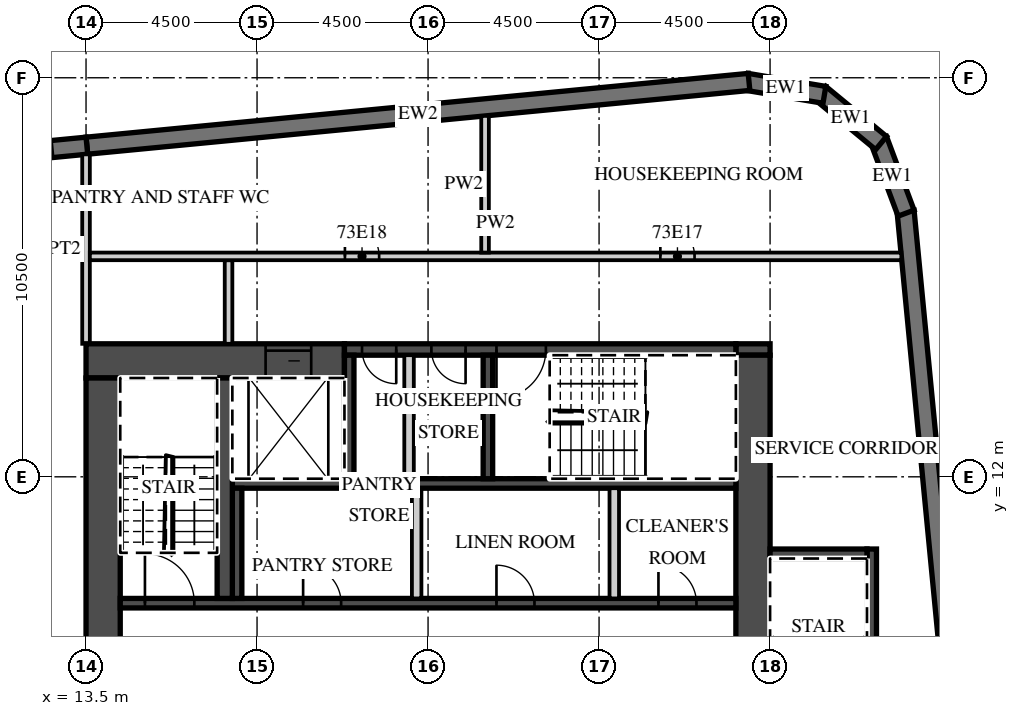
"""IFC4 building model, lengths in metres.
Left out: names, types, materials, properties, quantities, classifications, styles, units other than length and angle.
Written with IfcOpenShell. Run it as: python <this file> out.ifc"""

import sys

from ifc_helpers import new_model, si_unit, direction, frame, frame_2d, origin, place, context, subcontext, project, spatial, polyline, rectangle, outline, extrude, element, fill, save


model = new_model("IFC4")
c1 = context("Model", 3, precision=1e-05, world=origin(), true_north=direction((0.0, 1.0)))
c2 = subcontext(c1, "Body", "Model", "MODEL_VIEW")
j1 = project(units=[si_unit("LENGTHUNIT", "METRE"), si_unit("PLANEANGLEUNIT", "RADIAN")], contexts=[c1])
p1 = place(None, origin())
s1 = spatial("IfcSite", under=j1, at=p1, CompositionType="ELEMENT")
p2 = place(p1, origin())
s2 = spatial("IfcBuilding", under=s1, at=p2, CompositionType="ELEMENT")
p3 = place(p2, frame((0.0, 0.0, 291.6)))
s3 = spatial("IfcBuildingStorey", under=s2, at=p3, CompositionType="ELEMENT", Elevation=291.6)
p4 = place(p3, frame((38.132, -12.858, 0.0), z_axis=(0.0, 0.0, 1.0), x_axis=(-0.095847749461, 0.995396006082, 0.0)))
e1 = element("IfcWall", 1, at=p4, inside=s3, PredefinedType="SOLIDWALL", context=c2, shape_type="SweptSolid", body=[
    extrude(rectangle(XDim=32.0, YDim=0.45, at=frame_2d((16.0, 0.0))), origin(), (0.0, 0.0, 1.0), 3.02),
])
p5 = place(p3, frame((35.078, 18.938, 0.0), z_axis=(0.0, 0.0, 1.0), x_axis=(-0.350192909346, 0.936677599948, 0.0)))
e2 = element("IfcWall", 2, at=p5, inside=s3, PredefinedType="SOLIDWALL", context=c2, shape_type="SweptSolid", body=[
    extrude(outline(polyline([(0.0, -0.225), (2.071, -0.225), (1.95, 0.225), (0.121, 0.225), (0.0, -0.225)])), origin(), (0.0, 0.0, 1.0), 3.02),
])
p6 = place(p3, frame((34.421, 20.782, 0.0), z_axis=(0.0, 0.0, 1.0), x_axis=(-0.771593176315, 0.636116318187, 0.0)))
e3 = element("IfcWall", 3, at=p6, inside=s3, PredefinedType="SOLIDWALL", context=c2, shape_type="SweptSolid", body=[
    extrude(outline(polyline([(0.0, -0.225), (2.071, -0.225), (1.95, 0.225), (0.12, 0.225), (0.0, -0.225)])), origin(), (0.0, 0.0, 1.0), 3.02),
])
p7 = place(p3, frame((32.929, 22.051, 0.0), z_axis=(0.0, 0.0, 1.0), x_axis=(-0.986298144721, 0.164972633245, 0.0)))
e4 = element("IfcWall", 4, at=p7, inside=s3, PredefinedType="SOLIDWALL", context=c2, shape_type="SweptSolid", body=[
    extrude(outline(polyline([(0.0, -0.225), (2.07, -0.225), (1.95, 0.225), (0.121, 0.225), (0.0, -0.225)])), origin(), (0.0, 0.0, 1.0), 3.02),
])
p8 = place(p3, frame((30.946, 22.391, 0.0), z_axis=(0.0, 0.0, 1.0), x_axis=(-0.995396397117, -0.095843688398, 0.0)))
e5 = element("IfcWall", 5, at=p8, inside=s3, PredefinedType="SOLIDWALL", context=c2, shape_type="SweptSolid", body=[
    extrude(rectangle(XDim=17.505, YDim=0.45, at=frame_2d((8.752, 0.0))), origin(), (0.0, 0.0, 1.0), 3.02),
])
p9 = place(p3, frame((13.521, 20.713, 0.0), z_axis=(0.0, 0.0, 1.0), x_axis=(-0.995396277313, -0.095844932638, 0.0)))
e6 = element("IfcWall", 6, at=p9, inside=s3, PredefinedType="SOLIDWALL", context=c2, shape_type="SweptSolid", body=[
    extrude(rectangle(XDim=51.495, YDim=0.45, at=frame_2d((25.748, 0.0))), origin(), (0.0, 0.0, 1.0), 3.02),
])
p10 = place(p9, frame((0.91, 0.0, 0.45)))
e7 = element("IfcOpeningElement", 7, at=p10, cuts=e6, PredefinedType="OPENING", context=c2, shape_type="SweptSolid", body=[
    extrude(rectangle(XDim=2.7, YDim=2.25, at=frame_2d((1.35, 1.125))), frame((0.0, 0.235, 0.0), z_axis=(0.0, -1.0, 0.0), x_axis=(1.0, 0.0, 0.0)), (0.0, 0.0, 1.0), 0.47),
])
p11 = place(p9, frame((5.431, 0.0, 0.45)))
e8 = element("IfcOpeningElement", 8, at=p11, cuts=e6, PredefinedType="OPENING", context=c2, shape_type="SweptSolid", body=[
    extrude(rectangle(XDim=2.7, YDim=2.25, at=frame_2d((1.35, 1.125))), frame((0.0, 0.235, 0.0), z_axis=(0.0, -1.0, 0.0), x_axis=(1.0, 0.0, 0.0)), (0.0, 0.0, 1.0), 0.47),
])
p12 = place(p9, frame((9.952, 0.0, 0.45)))
e9 = element("IfcOpeningElement", 9, at=p12, cuts=e6, PredefinedType="OPENING", context=c2, shape_type="SweptSolid", body=[
    extrude(rectangle(XDim=2.7, YDim=2.25, at=frame_2d((1.35, 1.125))), frame((0.0, 0.235, 0.0), z_axis=(0.0, -1.0, 0.0), x_axis=(1.0, 0.0, 0.0)), (0.0, 0.0, 1.0), 0.47),
])
p13 = place(p9, frame((14.473, 0.0, 0.45)))
e10 = element("IfcOpeningElement", 10, at=p13, cuts=e6, PredefinedType="OPENING", context=c2, shape_type="SweptSolid", body=[
    extrude(rectangle(XDim=2.7, YDim=2.25, at=frame_2d((1.35, 1.125))), frame((0.0, 0.235, 0.0), z_axis=(0.0, -1.0, 0.0), x_axis=(1.0, 0.0, 0.0)), (0.0, 0.0, 1.0), 0.47),
])
p14 = place(p9, frame((18.994, 0.0, 0.45)))
e11 = element("IfcOpeningElement", 11, at=p14, cuts=e6, PredefinedType="OPENING", context=c2, shape_type="SweptSolid", body=[
    extrude(rectangle(XDim=2.7, YDim=2.25, at=frame_2d((1.35, 1.125))), frame((0.0, 0.235, 0.0), z_axis=(0.0, -1.0, 0.0), x_axis=(1.0, 0.0, 0.0)), (0.0, 0.0, 1.0), 0.47),
])
p15 = place(p9, frame((23.514, 0.0, 0.45)))
e12 = element("IfcOpeningElement", 12, at=p15, cuts=e6, PredefinedType="OPENING", context=c2, shape_type="SweptSolid", body=[
    extrude(rectangle(XDim=2.7, YDim=2.25, at=frame_2d((1.35, 1.125))), frame((0.0, 0.235, 0.0), z_axis=(0.0, -1.0, 0.0), x_axis=(1.0, 0.0, 0.0)), (0.0, 0.0, 1.0), 0.47),
])
p16 = place(p9, frame((28.035, 0.0, 0.45)))
e13 = element("IfcOpeningElement", 13, at=p16, cuts=e6, PredefinedType="OPENING", context=c2, shape_type="SweptSolid", body=[
    extrude(rectangle(XDim=2.7, YDim=2.25, at=frame_2d((1.35, 1.125))), frame((0.0, 0.235, 0.0), z_axis=(0.0, -1.0, 0.0), x_axis=(1.0, 0.0, 0.0)), (0.0, 0.0, 1.0), 0.47),
])
p17 = place(p9, frame((32.556, 0.0, 0.45)))
e14 = element("IfcOpeningElement", 14, at=p17, cuts=e6, PredefinedType="OPENING", context=c2, shape_type="SweptSolid", body=[
    extrude(rectangle(XDim=2.7, YDim=2.25, at=frame_2d((1.35, 1.125))), frame((0.0, 0.235, 0.0), z_axis=(0.0, -1.0, 0.0), x_axis=(1.0, 0.0, 0.0)), (0.0, 0.0, 1.0), 0.47),
])
p18 = place(p9, frame((37.077, 0.0, 0.45)))
e15 = element("IfcOpeningElement", 15, at=p18, cuts=e6, PredefinedType="OPENING", context=c2, shape_type="SweptSolid", body=[
    extrude(rectangle(XDim=2.7, YDim=2.25, at=frame_2d((1.35, 1.125))), frame((0.0, 0.235, 0.0), z_axis=(0.0, -1.0, 0.0), x_axis=(1.0, 0.0, 0.0)), (0.0, 0.0, 1.0), 0.47),
])
p19 = place(p9, frame((41.598, 0.0, 0.45)))
e16 = element("IfcOpeningElement", 16, at=p19, cuts=e6, PredefinedType="OPENING", context=c2, shape_type="SweptSolid", body=[
    extrude(rectangle(XDim=2.7, YDim=2.25, at=frame_2d((1.35, 1.125))), frame((0.0, 0.235, 0.0), z_axis=(0.0, -1.0, 0.0), x_axis=(1.0, 0.0, 0.0)), (0.0, 0.0, 1.0), 0.47),
])
p20 = place(p9, frame((46.118, 0.0, 0.45)))
e17 = element("IfcOpeningElement", 17, at=p20, cuts=e6, PredefinedType="OPENING", context=c2, shape_type="SweptSolid", body=[
    extrude(rectangle(XDim=2.7, YDim=2.25, at=frame_2d((1.35, 1.125))), frame((0.0, 0.235, 0.0), z_axis=(0.0, -1.0, 0.0), x_axis=(1.0, 0.0, 0.0)), (0.0, 0.0, 1.0), 0.47),
])
p21 = place(p3, frame((13.5, 15.5, 0.0), z_axis=(0.0, 0.0, 1.0), x_axis=(0.0, 1.0, 0.0)))
e18 = element("IfcWall", 18, at=p21, inside=s3, PredefinedType="PARTITIONING", context=c2, shape_type="SweptSolid", body=[
    extrude(rectangle(XDim=4.985, YDim=0.2, at=frame_2d((2.493, 0.0))), origin(), (0.0, 0.0, 1.0), 3.02),
])
p22 = place(p3, frame((13.5, 15.05, 0.0), z_axis=(0.0, 0.0, 1.0), x_axis=(1.0, 0.0, 0.0)))
e19 = element("IfcWall", 19, at=p22, inside=s3, PredefinedType="SHEAR", context=c2, shape_type="SweptSolid", body=[
    extrude(rectangle(XDim=6.8, YDim=0.9, at=frame_2d((3.4, 0.0))), origin(), (0.0, 0.0, 1.0), 3.02),
])
p23 = place(p22, frame((4.725, 0.0, 0.0)))
e20 = element("IfcOpeningElement", 20, at=p23, cuts=e19, PredefinedType="OPENING", context=c2, shape_type="SweptSolid", body=[
    extrude(rectangle(XDim=1.2, YDim=2.1, at=frame_2d((0.6, 1.05))), frame((0.0, 0.46, 0.0), z_axis=(0.0, -1.0, 0.0), x_axis=(1.0, 0.0, 0.0)), (0.0, 0.0, 1.0), 0.92),
])
p24 = place(p3, frame((30.6, 15.35, 0.0), z_axis=(0.0, 0.0, 1.0), x_axis=(1.0, 0.0, 0.0)))
e21 = element("IfcWall", 21, at=p24, inside=s3, PredefinedType="SHEAR", context=c2, shape_type="SweptSolid", body=[
    extrude(rectangle(XDim=0.9, YDim=0.3, at=frame_2d((0.45, 0.0))), origin(), (0.0, 0.0, 1.0), 3.02),
])
p25 = place(p3, frame((20.3, 15.35, 0.0), z_axis=(0.0, 0.0, 1.0), x_axis=(1.0, 0.0, 0.0)))
e22 = element("IfcWall", 22, at=p25, inside=s3, PredefinedType="SHEAR", context=c2, shape_type="SweptSolid", body=[
    extrude(rectangle(XDim=10.3, YDim=0.3, at=frame_2d((5.15, 0.0))), origin(), (0.0, 0.0, 1.0), 3.02),
])
p26 = place(p25, frame((4.0, 0.0, 0.0)))
e23 = element("IfcOpeningElement", 23, at=p26, cuts=e22, PredefinedType="OPENING", context=c2, shape_type="SweptSolid", body=[
    extrude(rectangle(XDim=1.3, YDim=2.1, at=frame_2d((0.65, 1.05))), frame((0.0, 0.16, 0.0), z_axis=(0.0, -1.0, 0.0), x_axis=(1.0, 0.0, 0.0)), (0.0, 0.0, 1.0), 0.32),
])
p27 = place(p25, frame((2.288, 0.0, 0.0)))
e24 = element("IfcOpeningElement", 24, at=p27, cuts=e22, PredefinedType="OPENING", context=c2, shape_type="SweptSolid", body=[
    extrude(rectangle(XDim=0.9, YDim=2.1, at=frame_2d((0.45, 1.05))), frame((0.0, 0.16, 0.0), z_axis=(0.0, -1.0, 0.0), x_axis=(1.0, 0.0, 0.0)), (0.0, 0.0, 1.0), 0.32),
])
p28 = place(p25, frame((0.462, 0.0, 0.0)))
e25 = element("IfcOpeningElement", 25, at=p28, cuts=e22, PredefinedType="OPENING", context=c2, shape_type="SweptSolid", body=[
    extrude(rectangle(XDim=0.9, YDim=2.1, at=frame_2d((0.45, 1.05))), frame((0.0, 0.16, 0.0), z_axis=(0.0, -1.0, 0.0), x_axis=(1.0, 0.0, 0.0)), (0.0, 0.0, 1.0), 0.32),
])
p29 = place(p3, frame((31.05, 2.4, 0.0), z_axis=(0.0, 0.0, 1.0), x_axis=(0.0, 1.0, 0.0)))
e26 = element("IfcWall", 26, at=p29, inside=s3, PredefinedType="SHEAR", context=c2, shape_type="SweptSolid", body=[
    extrude(rectangle(XDim=12.8, YDim=0.9, at=frame_2d((6.4, 0.0))), origin(), (0.0, 0.0, 1.0), 3.02),
])
p30 = place(p29, frame((0.2, 0.0, 0.0)))
e27 = element("IfcOpeningElement", 27, at=p30, cuts=e26, PredefinedType="OPENING", context=c2, shape_type="SweptSolid", body=[
    extrude(rectangle(XDim=1.1, YDim=2.1, at=frame_2d((0.55, 1.05))), frame((0.0, 0.46, 0.0), z_axis=(0.0, -1.0, 0.0), x_axis=(1.0, 0.0, 0.0)), (0.0, 0.0, 1.0), 0.92),
])
p31 = place(p3, frame((13.95, 2.4, 0.0), z_axis=(0.0, 0.0, 1.0), x_axis=(0.0, 1.0, 0.0)))
e28 = element("IfcWall", 28, at=p31, inside=s3, PredefinedType="SHEAR", context=c2, shape_type="SweptSolid", body=[
    extrude(rectangle(XDim=12.2, YDim=0.9, at=frame_2d((6.1, 0.0))), origin(), (0.0, 0.0, 1.0), 3.02),
])
p32 = place(p3, frame((14.4, 8.675, 0.0), z_axis=(0.0, 0.0, 1.0), x_axis=(1.0, 0.0, 0.0)))
e29 = element("IfcWall", 29, at=p32, inside=s3, PredefinedType="SHEAR", context=c2, shape_type="SweptSolid", body=[
    extrude(rectangle(XDim=16.2, YDim=0.25, at=frame_2d((8.1, 0.0))), origin(), (0.0, 0.0, 1.0), 3.02),
])
p33 = place(p32, frame((0.65, 0.0, 0.0)))
e30 = element("IfcOpeningElement", 30, at=p33, cuts=e29, PredefinedType="OPENING", context=c2, shape_type="SweptSolid", body=[
    extrude(rectangle(XDim=1.3, YDim=2.1, at=frame_2d((0.65, 1.05))), frame((0.0, 0.135, 0.0), z_axis=(0.0, -1.0, 0.0), x_axis=(1.0, 0.0, 0.0)), (0.0, 0.0, 1.0), 0.27),
])
p34 = place(p32, frame((14.163, 0.0, 0.0)))
e31 = element("IfcOpeningElement", 31, at=p34, cuts=e29, PredefinedType="OPENING", context=c2, shape_type="SweptSolid", body=[
    extrude(rectangle(XDim=1.0, YDim=2.1, at=frame_2d((0.5, 1.05))), frame((0.0, 0.135, 0.0), z_axis=(0.0, -1.0, 0.0), x_axis=(1.0, 0.0, 0.0)), (0.0, 0.0, 1.0), 0.27),
])
p35 = place(p32, frame((9.9, 0.0, 0.0)))
e32 = element("IfcOpeningElement", 32, at=p35, cuts=e29, PredefinedType="OPENING", context=c2, shape_type="SweptSolid", body=[
    extrude(rectangle(XDim=1.0, YDim=2.1, at=frame_2d((0.5, 1.05))), frame((0.0, 0.135, 0.0), z_axis=(0.0, -1.0, 0.0), x_axis=(1.0, 0.0, 0.0)), (0.0, 0.0, 1.0), 0.27),
])
p36 = place(p32, frame((4.812, 0.0, 0.0)))
e33 = element("IfcOpeningElement", 33, at=p36, cuts=e29, PredefinedType="OPENING", context=c2, shape_type="SweptSolid", body=[
    extrude(rectangle(XDim=1.0, YDim=2.1, at=frame_2d((0.5, 1.05))), frame((0.0, 0.135, 0.0), z_axis=(0.0, -1.0, 0.0), x_axis=(1.0, 0.0, 0.0)), (0.0, 0.0, 1.0), 0.27),
])
p37 = place(p3, frame((17.35, 11.825, 0.0), z_axis=(0.0, 0.0, 1.0), x_axis=(1.0, 0.0, 0.0)))
e34 = element("IfcWall", 34, at=p37, inside=s3, PredefinedType="SHEAR", context=c2, shape_type="SweptSolid", body=[
    extrude(rectangle(XDim=13.25, YDim=0.25, at=frame_2d((6.625, 0.0))), origin(), (0.0, 0.0, 1.0), 3.02),
])
p38 = place(p3, frame((17.475, 8.8, 0.0), z_axis=(0.0, 0.0, 1.0), x_axis=(0.0, 1.0, 0.0)))
e35 = element("IfcWall", 35, at=p38, inside=s3, PredefinedType="SHEAR", context=c2, shape_type="SweptSolid", body=[
    extrude(rectangle(XDim=2.9, YDim=0.25, at=frame_2d((1.45, 0.0))), origin(), (0.0, 0.0, 1.0), 3.02),
])
for number, where, z_axis, x_axis in (
    (36, (27.4, 8.8, 0.0), (0.0, 0.0, 1.0), (0.0, 1.0, 0.0)),
    (37, (22.2, 8.8, 0.0), (0.0, 0.0, 1.0), (0.0, 1.0, 0.0)),
):
    element("IfcWall", number, at=place(p3, frame(where, z_axis=z_axis, x_axis=x_axis)), inside=s3, PredefinedType="PARTITIONING", context=c2, shape_type="SweptSolid", body=[
        extrude(rectangle(XDim=2.9, YDim=0.25, at=frame_2d((1.45, 0.0))), origin(), (0.0, 0.0, 1.0), 3.02),
    ])
p39 = place(p3, frame((17.15, 8.8, 0.0), z_axis=(0.0, 0.0, 1.0), x_axis=(0.0, 1.0, 0.0)))
e38 = element("IfcWall", 38, at=p39, inside=s3, PredefinedType="SHEAR", context=c2, shape_type="SweptSolid", body=[
    extrude(rectangle(XDim=5.8, YDim=0.4, at=frame_2d((2.9, 0.0))), origin(), (0.0, 0.0, 1.0), 3.02),
])
for number, where, z_axis, x_axis in (
    (39, (20.425, 11.95, 0.0), (0.0, 0.0, 1.0), (0.0, 1.0, 0.0)),
    (40, (24.075, 11.95, 0.0), (0.0, 0.0, 1.0), (0.0, 1.0, 0.0)),
):
    element("IfcWall", number, at=place(p3, frame(where, z_axis=z_axis, x_axis=x_axis)), inside=s3, PredefinedType="SHEAR", context=c2, shape_type="SweptSolid", body=[
        extrude(rectangle(XDim=3.25, YDim=0.25, at=frame_2d((1.625, 0.0))), origin(), (0.0, 0.0, 1.0), 3.02),
    ])
p40 = place(p3, frame((22.0, 11.95, 0.0), z_axis=(0.0, 0.0, 1.0), x_axis=(0.0, 1.0, 0.0)))
e41 = element("IfcWall", 41, at=p40, inside=s3, PredefinedType="PARTITIONING", context=c2, shape_type="SweptSolid", body=[
    extrude(rectangle(XDim=3.25, YDim=0.25, at=frame_2d((1.625, 0.0))), origin(), (0.0, 0.0, 1.0), 3.02),
])
p41 = place(p3, frame((34.175, 1.75, 0.0), z_axis=(0.0, 0.0, 1.0), x_axis=(0.0, 1.0, 0.0)))
e42 = element("IfcWall", 42, at=p41, inside=s3, PredefinedType="SHEAR", context=c2, shape_type="SweptSolid", body=[
    extrude(rectangle(XDim=8.35, YDim=0.25, at=frame_2d((4.175, 0.0))), origin(), (0.0, 0.0, 1.0), 3.02),
])
p42 = place(p3, frame((31.5, 9.975, 0.0), z_axis=(0.0, 0.0, 1.0), x_axis=(1.0, 0.0, 0.0)))
e43 = element("IfcWall", 43, at=p42, inside=s3, PredefinedType="SHEAR", context=c2, shape_type="SweptSolid", body=[
    extrude(rectangle(XDim=2.55, YDim=0.25, at=frame_2d((1.275, 0.0))), origin(), (0.0, 0.0, 1.0), 3.02),
])
p43 = place(p3, frame((17.25, 15.5, 0.0), z_axis=(0.0, 0.0, 1.0), x_axis=(0.0, 1.0, 0.0)))
e44 = element("IfcWall", 44, at=p43, inside=s3, PredefinedType="PARTITIONING", context=c2, shape_type="SweptSolid", body=[
    extrude(rectangle(XDim=2.2, YDim=0.2, at=frame_2d((1.1, 0.0))), origin(), (0.0, 0.0, 1.0), 3.02),
])
p44 = place(p3, frame((13.6, 17.8, 0.0), z_axis=(0.0, 0.0, 1.0), x_axis=(1.0, 0.0, 0.0)))
e45 = element("IfcWall", 45, at=p44, inside=s3, PredefinedType="PARTITIONING", context=c2, shape_type="SweptSolid", body=[
    extrude(rectangle(XDim=21.354, YDim=0.2, at=frame_2d((10.677, 0.0))), origin(), (0.0, 0.0, 1.0), 3.02),
])
p45 = place(p44, frame((15.012, 0.0, 0.0)))
e46 = element("IfcOpeningElement", 46, at=p45, cuts=e45, PredefinedType="OPENING", context=c2, shape_type="SweptSolid", body=[
    extrude(rectangle(XDim=0.9, YDim=2.1, at=frame_2d((0.45, 1.05))), frame((0.0, 0.11, 0.0), z_axis=(0.0, -1.0, 0.0), x_axis=(1.0, 0.0, 0.0)), (0.0, 0.0, 1.0), 0.22),
])
p46 = place(p44, frame((6.712, 0.0, 0.0)))
e47 = element("IfcOpeningElement", 47, at=p46, cuts=e45, PredefinedType="OPENING", context=c2, shape_type="SweptSolid", body=[
    extrude(rectangle(XDim=0.9, YDim=2.1, at=frame_2d((0.45, 1.05))), frame((0.0, 0.11, 0.0), z_axis=(0.0, -1.0, 0.0), x_axis=(1.0, 0.0, 0.0)), (0.0, 0.0, 1.0), 0.22),
])
p47 = place(p3, frame((24.0, 17.9, 0.0), z_axis=(0.0, 0.0, 1.0), x_axis=(0.0, 1.0, 0.0)))
e48 = element("IfcWall", 48, at=p47, inside=s3, PredefinedType="PARTITIONING", context=c2, shape_type="SweptSolid", body=[
    extrude(rectangle(XDim=3.597, YDim=0.2, at=frame_2d((1.798, 0.0))), origin(), (0.0, 0.0, 1.0), 3.02),
])
p48 = place(p10, origin())
e49 = element("IfcWindow", 49, at=p48, inside=s3, PartitioningType="SINGLE_PANEL", PredefinedType="WINDOW", context=c2, shape_type="SweptSolid", body=[
    extrude(rectangle(XDim=2.7, YDim=2.25, at=frame_2d((1.35, 1.125))), frame((0.0, 0.09, 0.0), z_axis=(0.0, -1.0, 0.0), x_axis=(1.0, 0.0, 0.0)), (0.0, 0.0, 1.0), 0.06),
])
fill(e7, e49)
p49 = place(p23, origin())
e50 = element("IfcDoor", 50, at=p49, inside=s3, OperationType="SLIDING_TO_LEFT", PredefinedType="DOOR", context=c2, shape_type="SweptSolid", body=[
    extrude(rectangle(XDim=1.2, YDim=2.1, at=frame_2d((0.6, 1.05))), frame((0.0, 0.025, 0.0), z_axis=(0.0, -1.0, 0.0), x_axis=(1.0, 0.0, 0.0)), (0.0, 0.0, 1.0), 0.05),
])
fill(e20, e50)
p50 = place(p33, origin())
e51 = element("IfcDoor", 51, at=p50, inside=s3, OperationType="SINGLE_SWING_LEFT", PredefinedType="DOOR", context=c2, shape_type="SweptSolid", body=[
    extrude(rectangle(XDim=1.3, YDim=2.1, at=frame_2d((0.65, 1.05))), frame((0.0, 0.025, 0.0), z_axis=(0.0, -1.0, 0.0), x_axis=(1.0, 0.0, 0.0)), (0.0, 0.0, 1.0), 0.05),
])
fill(e30, e51)
p51 = place(p26, origin())
e52 = element("IfcDoor", 52, at=p51, inside=s3, OperationType="SINGLE_SWING_LEFT", PredefinedType="DOOR", context=c2, shape_type="SweptSolid", body=[
    extrude(rectangle(XDim=1.3, YDim=2.1, at=frame_2d((0.65, 1.05))), frame((0.0, 0.025, 0.0), z_axis=(0.0, -1.0, 0.0), x_axis=(1.0, 0.0, 0.0)), (0.0, 0.0, 1.0), 0.05),
])
fill(e23, e52)
p52 = place(p27, origin())
e53 = element("IfcDoor", 53, at=p52, inside=s3, OperationType="SINGLE_SWING_RIGHT", PredefinedType="DOOR", context=c2, shape_type="SweptSolid", body=[
    extrude(rectangle(XDim=0.9, YDim=2.1, at=frame_2d((0.45, 1.05))), frame((0.0, 0.025, 0.0), z_axis=(0.0, -1.0, 0.0), x_axis=(1.0, 0.0, 0.0)), (0.0, 0.0, 1.0), 0.05),
])
fill(e24, e53)
p53 = place(p28, origin())
e54 = element("IfcDoor", 54, at=p53, inside=s3, OperationType="SINGLE_SWING_RIGHT", PredefinedType="DOOR", context=c2, shape_type="SweptSolid", body=[
    extrude(rectangle(XDim=0.9, YDim=2.1, at=frame_2d((0.45, 1.05))), frame((0.0, 0.025, 0.0), z_axis=(0.0, -1.0, 0.0), x_axis=(1.0, 0.0, 0.0)), (0.0, 0.0, 1.0), 0.05),
])
fill(e25, e54)
p54 = place(p34, origin())
e55 = element("IfcDoor", 55, at=p54, inside=s3, OperationType="SINGLE_SWING_LEFT", PredefinedType="DOOR", context=c2, shape_type="SweptSolid", body=[
    extrude(rectangle(XDim=1.0, YDim=2.1, at=frame_2d((0.5, 1.05))), frame((0.0, 0.025, 0.0), z_axis=(0.0, -1.0, 0.0), x_axis=(1.0, 0.0, 0.0)), (0.0, 0.0, 1.0), 0.05),
])
fill(e31, e55)
p55 = place(p35, origin())
e56 = element("IfcDoor", 56, at=p55, inside=s3, OperationType="SINGLE_SWING_LEFT", PredefinedType="DOOR", context=c2, shape_type="SweptSolid", body=[
    extrude(rectangle(XDim=1.0, YDim=2.1, at=frame_2d((0.5, 1.05))), frame((0.0, 0.025, 0.0), z_axis=(0.0, -1.0, 0.0), x_axis=(1.0, 0.0, 0.0)), (0.0, 0.0, 1.0), 0.05),
])
fill(e32, e56)
p56 = place(p36, origin())
e57 = element("IfcDoor", 57, at=p56, inside=s3, OperationType="SINGLE_SWING_LEFT", PredefinedType="DOOR", context=c2, shape_type="SweptSolid", body=[
    extrude(rectangle(XDim=1.0, YDim=2.1, at=frame_2d((0.5, 1.05))), frame((0.0, 0.025, 0.0), z_axis=(0.0, -1.0, 0.0), x_axis=(1.0, 0.0, 0.0)), (0.0, 0.0, 1.0), 0.05),
])
fill(e33, e57)
p57 = place(p45, origin())
e58 = element("IfcDoor", 58, at=p57, inside=s3, OperationType="SINGLE_SWING_LEFT", PredefinedType="DOOR", context=c2, shape_type="SweptSolid", body=[
    extrude(rectangle(XDim=0.9, YDim=2.1, at=frame_2d((0.45, 1.05))), frame((0.0, 0.025, 0.0), z_axis=(0.0, -1.0, 0.0), x_axis=(1.0, 0.0, 0.0)), (0.0, 0.0, 1.0), 0.05),
])
fill(e46, e58)
p58 = place(p46, origin())
e59 = element("IfcDoor", 59, at=p58, inside=s3, OperationType="SINGLE_SWING_LEFT", PredefinedType="DOOR", context=c2, shape_type="SweptSolid", body=[
    extrude(rectangle(XDim=0.9, YDim=2.1, at=frame_2d((0.45, 1.05))), frame((0.0, 0.025, 0.0), z_axis=(0.0, -1.0, 0.0), x_axis=(1.0, 0.0, 0.0)), (0.0, 0.0, 1.0), 0.05),
])
fill(e47, e59)
save(model, sys.argv[1])
